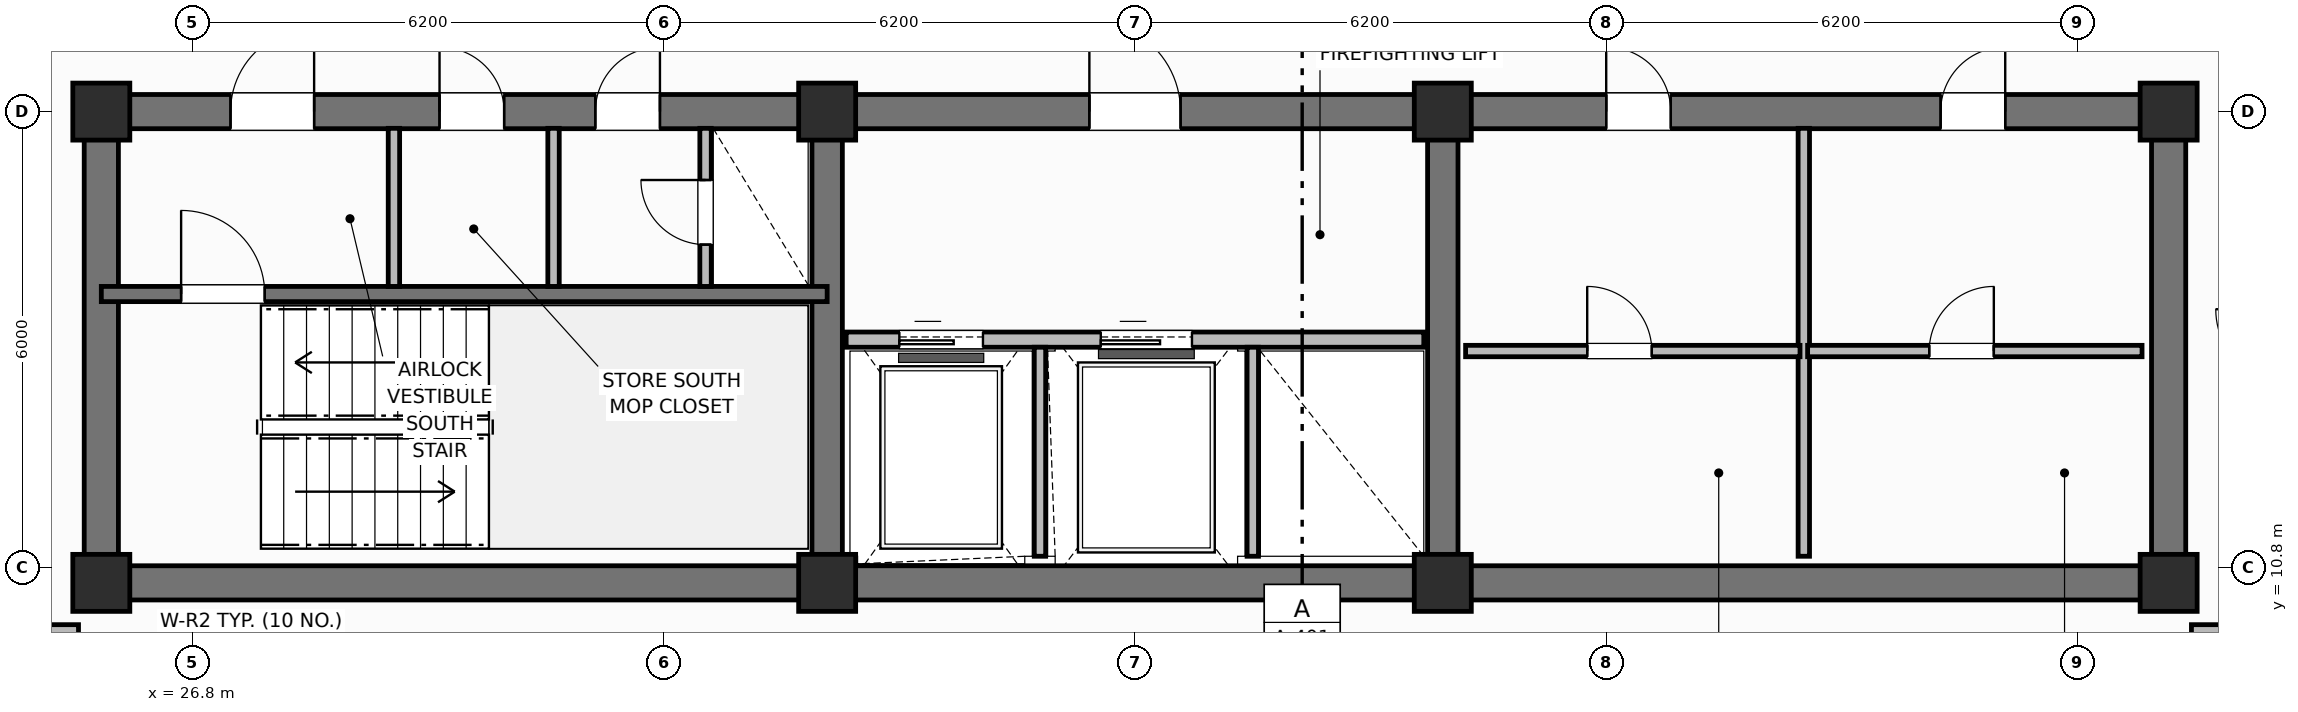
"""IFC4 building model, lengths in metres.
Left out: names, types, materials, properties, quantities, classifications, styles, units other than length and angle.
Written with IfcOpenShell. Run it as: python <this file> out.ifc"""

import sys

from ifc_helpers import new_model, si_unit, direction, frame, frame_2d, origin, origin_2d, place, context, subcontext, project, spatial, rectangle, extrude, element, fill, save


model = new_model("IFC4")
c1 = context("Model", 3, precision=1e-05, world=origin(), true_north=direction((0.0, 1.0)))
c2 = subcontext(c1, "Body", "Model", "MODEL_VIEW")
j1 = project(units=[si_unit("LENGTHUNIT", "METRE"), si_unit("PLANEANGLEUNIT", "RADIAN")], contexts=[c1])
p1 = place(None, origin())
s1 = spatial("IfcSite", under=j1, at=p1, CompositionType="ELEMENT")
p2 = place(p1, origin())
s2 = spatial("IfcBuilding", under=s1, at=p2, CompositionType="ELEMENT")
p3 = place(p2, frame((0.0, 0.0, 267.6)))
s3 = spatial("IfcBuildingStorey", under=s2, at=p3, CompositionType="ELEMENT", Elevation=267.6)
p4 = place(p3, frame((52.8, 10.6, 0.0), z_axis=(0.0, 0.0, 1.0), x_axis=(-1.0, 0.0, 0.0)))
e1 = element("IfcWall", 1, at=p4, inside=s3, PredefinedType="SHEAR", context=c2, shape_type="SweptSolid", body=[
    extrude(rectangle(XDim=27.2, YDim=0.45, at=frame_2d((13.6, 0.0))), origin(), (0.0, 0.0, 1.0), 3.7),
])
for number, where, z_axis, x_axis in (
    (2, (25.6, 10.825, 0.0), (0.0, 0.0, 1.0), (0.0, 1.0, 0.0)),
    (3, (52.8, 10.825, 0.0), (0.0, 0.0, 1.0), (0.0, 1.0, 0.0)),
):
    element("IfcWall", number, at=place(p3, frame(where, z_axis=z_axis, x_axis=x_axis)), inside=s3, PredefinedType="SHEAR", context=c2, shape_type="SweptSolid", body=[
        extrude(rectangle(XDim=5.75, YDim=0.45, at=frame_2d((2.875, 0.0))), origin(), (0.0, 0.0, 1.0), 3.7),
    ])
p5 = place(p3, frame((25.6, 16.8, 0.0), z_axis=(0.0, 0.0, 1.0), x_axis=(1.0, 0.0, 0.0)))
e4 = element("IfcWall", 4, at=p5, inside=s3, PredefinedType="SHEAR", context=c2, shape_type="SweptSolid", body=[
    extrude(rectangle(XDim=27.2, YDim=0.45, at=frame_2d((13.6, 0.0))), origin(), (0.0, 0.0, 1.0), 3.7),
])
p6 = place(p5, frame((1.7, 0.0, 0.0)))
e5 = element("IfcOpeningElement", 5, at=p6, cuts=e4, PredefinedType="OPENING", context=c2, shape_type="SweptSolid", body=[
    extrude(rectangle(XDim=1.1, YDim=2.15, at=frame_2d((0.55, 1.075))), frame((0.0, 0.235, 0.0), z_axis=(0.0, -1.0, 0.0), x_axis=(1.0, 0.0, 0.0)), (0.0, 0.0, 1.0), 0.47),
])
p7 = place(p5, frame((4.45, 0.0, 0.0)))
e6 = element("IfcOpeningElement", 6, at=p7, cuts=e4, PredefinedType="OPENING", context=c2, shape_type="SweptSolid", body=[
    extrude(rectangle(XDim=0.85, YDim=2.1, at=frame_2d((0.425, 1.05))), frame((0.0, 0.235, 0.0), z_axis=(0.0, -1.0, 0.0), x_axis=(1.0, 0.0, 0.0)), (0.0, 0.0, 1.0), 0.47),
])
p8 = place(p5, frame((6.5, 0.0, 0.0)))
e7 = element("IfcOpeningElement", 7, at=p8, cuts=e4, PredefinedType="OPENING", context=c2, shape_type="SweptSolid", body=[
    extrude(rectangle(XDim=0.85, YDim=2.1, at=frame_2d((0.425, 1.05))), frame((0.0, 0.235, 0.0), z_axis=(0.0, -1.0, 0.0), x_axis=(1.0, 0.0, 0.0)), (0.0, 0.0, 1.0), 0.47),
])
p9 = place(p5, frame((13.0, 0.0, 0.0)))
e8 = element("IfcOpeningElement", 8, at=p9, cuts=e4, PredefinedType="OPENING", context=c2, shape_type="SweptSolid", body=[
    extrude(rectangle(XDim=1.2, YDim=2.15, at=frame_2d((0.6, 1.075))), frame((0.0, 0.235, 0.0), z_axis=(0.0, -1.0, 0.0), x_axis=(1.0, 0.0, 0.0)), (0.0, 0.0, 1.0), 0.47),
])
p10 = place(p5, frame((19.8, 0.0, 0.0)))
e9 = element("IfcOpeningElement", 9, at=p10, cuts=e4, PredefinedType="OPENING", context=c2, shape_type="SweptSolid", body=[
    extrude(rectangle(XDim=0.85, YDim=2.1, at=frame_2d((0.425, 1.05))), frame((0.0, 0.235, 0.0), z_axis=(0.0, -1.0, 0.0), x_axis=(1.0, 0.0, 0.0)), (0.0, 0.0, 1.0), 0.47),
])
p11 = place(p5, frame((24.2, 0.0, 0.0)))
e10 = element("IfcOpeningElement", 10, at=p11, cuts=e4, PredefinedType="OPENING", context=c2, shape_type="SweptSolid", body=[
    extrude(rectangle(XDim=0.85, YDim=2.1, at=frame_2d((0.425, 1.05))), frame((0.0, 0.235, 0.0), z_axis=(0.0, -1.0, 0.0), x_axis=(1.0, 0.0, 0.0)), (0.0, 0.0, 1.0), 0.47),
])
for number, where, z_axis, x_axis in (
    (11, (35.15, 10.825, 0.0), (0.0, 0.0, 1.0), (0.0, 1.0, 0.0)),
    (12, (43.25, 10.825, 0.0), (0.0, 0.0, 1.0), (0.0, 1.0, 0.0)),
):
    element("IfcWall", number, at=place(p3, frame(where, z_axis=z_axis, x_axis=x_axis)), inside=s3, PredefinedType="SHEAR", context=c2, shape_type="SweptSolid", body=[
        extrude(rectangle(XDim=5.75, YDim=0.4, at=frame_2d((2.875, 0.0))), origin(), (0.0, 0.0, 1.0), 3.7),
    ])
for number, where, z_axis, x_axis in (
    (13, (25.6, 10.6, 0.0), (0.0, 0.0, 1.0), (1.0, 0.0, 0.0)),
    (14, (25.6, 16.8, 0.0), (0.0, 0.0, 1.0), (1.0, 0.0, 0.0)),
    (15, (35.15, 10.6, 0.0), (0.0, 0.0, 1.0), (1.0, 0.0, 0.0)),
    (16, (35.15, 16.8, 0.0), (0.0, 0.0, 1.0), (1.0, 0.0, 0.0)),
    (17, (43.25, 10.6, 0.0), (0.0, 0.0, 1.0), (1.0, 0.0, 0.0)),
    (18, (43.25, 16.8, 0.0), (0.0, 0.0, 1.0), (1.0, 0.0, 0.0)),
    (19, (52.8, 10.6, 0.0), (0.0, 0.0, 1.0), (1.0, 0.0, 0.0)),
    (20, (52.8, 16.8, 0.0), (0.0, 0.0, 1.0), (1.0, 0.0, 0.0)),
):
    element("IfcColumn", number, at=place(p3, frame(where, z_axis=z_axis, x_axis=x_axis)), inside=s3, PredefinedType="COLUMN", context=c2, shape_type="SweptSolid", body=[
        extrude(rectangle(XDim=0.75, YDim=0.75, at=origin_2d()), origin(), (0.0, 0.0, 1.0), 3.7),
    ])
p12 = place(p3, frame((25.6, 14.4, 0.0), z_axis=(0.0, 0.0, 1.0), x_axis=(1.0, 0.0, 0.0)))
e21 = element("IfcWall", 21, at=p12, inside=s3, PredefinedType="SHEAR", context=c2, shape_type="SweptSolid", body=[
    extrude(rectangle(XDim=9.55, YDim=0.2, at=frame_2d((4.775, 0.0))), origin(), (0.0, 0.0, 1.0), 3.7),
])
p13 = place(p12, frame((1.05, 0.0, 0.0)))
e22 = element("IfcOpeningElement", 22, at=p13, cuts=e21, PredefinedType="OPENING", context=c2, shape_type="SweptSolid", body=[
    extrude(rectangle(XDim=1.1, YDim=2.15, at=frame_2d((0.55, 1.075))), frame((0.0, 0.11, 0.0), z_axis=(0.0, -1.0, 0.0), x_axis=(1.0, 0.0, 0.0)), (0.0, 0.0, 1.0), 0.22),
])
for number, where, z_axis, x_axis in (
    (23, (29.45, 14.5, 0.0), (0.0, 0.0, 1.0), (0.0, 1.0, 0.0)),
    (24, (31.55, 14.5, 0.0), (0.0, 0.0, 1.0), (0.0, 1.0, 0.0)),
):
    element("IfcWall", number, at=place(p3, frame(where, z_axis=z_axis, x_axis=x_axis)), inside=s3, PredefinedType="PARTITIONING", context=c2, shape_type="SweptSolid", body=[
        extrude(rectangle(XDim=2.08, YDim=0.15, at=frame_2d((1.04, 0.0))), origin(), (0.0, 0.0, 1.0), 2.56),
    ])
p14 = place(p3, frame((33.55, 14.5, 0.0), z_axis=(0.0, 0.0, 1.0), x_axis=(0.0, 1.0, 0.0)))
e25 = element("IfcWall", 25, at=p14, inside=s3, PredefinedType="PARTITIONING", context=c2, shape_type="SweptSolid", body=[
    extrude(rectangle(XDim=2.08, YDim=0.15, at=frame_2d((1.04, 0.0))), origin(), (0.0, 0.0, 1.0), 2.56),
])
p15 = place(p14, frame((0.55, 0.0, 0.0)))
e26 = element("IfcOpeningElement", 26, at=p15, cuts=e25, PredefinedType="OPENING", context=c2, shape_type="SweptSolid", body=[
    extrude(rectangle(XDim=0.85, YDim=2.05, at=frame_2d((0.425, 1.025))), frame((0.0, 0.085, 0.0), z_axis=(0.0, -1.0, 0.0), x_axis=(1.0, 0.0, 0.0)), (0.0, 0.0, 1.0), 0.17),
])
p16 = place(p3, frame((35.4, 13.8, 0.0), z_axis=(0.0, 0.0, 1.0), x_axis=(1.0, 0.0, 0.0)))
e27 = element("IfcWall", 27, at=p16, inside=s3, PredefinedType="PARTITIONING", context=c2, shape_type="SweptSolid", body=[
    extrude(rectangle(XDim=7.6, YDim=0.2, at=frame_2d((3.8, 0.0))), origin(), (0.0, 0.0, 1.0), 2.33),
])
p17 = place(p16, frame((0.7, 0.0, 0.0)))
e28 = element("IfcOpeningElement", 28, at=p17, cuts=e27, PredefinedType="OPENING", context=c2, shape_type="SweptSolid", body=[
    extrude(rectangle(XDim=1.1, YDim=2.15, at=frame_2d((0.55, 1.075))), frame((0.0, 0.11, 0.0), z_axis=(0.0, -1.0, 0.0), x_axis=(1.0, 0.0, 0.0)), (0.0, 0.0, 1.0), 0.22),
])
p18 = place(p16, frame((3.35, 0.0, 0.0)))
e29 = element("IfcOpeningElement", 29, at=p18, cuts=e27, PredefinedType="OPENING", context=c2, shape_type="SweptSolid", body=[
    extrude(rectangle(XDim=1.2, YDim=2.15, at=frame_2d((0.6, 1.075))), frame((0.0, 0.11, 0.0), z_axis=(0.0, -1.0, 0.0), x_axis=(1.0, 0.0, 0.0)), (0.0, 0.0, 1.0), 0.22),
])
for number, where, z_axis, x_axis in (
    (30, (37.95, 10.95, 0.0), (0.0, 0.0, 1.0), (0.0, 1.0, 0.0)),
    (31, (40.75, 10.95, 0.0), (0.0, 0.0, 1.0), (0.0, 1.0, 0.0)),
):
    element("IfcWall", number, at=place(p3, frame(where, z_axis=z_axis, x_axis=x_axis)), inside=s3, PredefinedType="PARTITIONING", context=c2, shape_type="SweptSolid", body=[
        extrude(rectangle(XDim=2.75, YDim=0.15, at=frame_2d((1.375, 0.0))), origin(), (0.0, 0.0, 1.0), 2.56),
    ])
p19 = place(p3, frame((48.0, 10.95, 0.0), z_axis=(0.0, 0.0, 1.0), x_axis=(0.0, 1.0, 0.0)))
e32 = element("IfcWall", 32, at=p19, inside=s3, PredefinedType="PARTITIONING", context=c2, shape_type="SweptSolid", body=[
    extrude(rectangle(XDim=5.63, YDim=0.15, at=frame_2d((2.815, 0.0))), origin(), (0.0, 0.0, 1.0), 2.56),
])
p20 = place(p3, frame((43.55, 13.65, 0.0), z_axis=(0.0, 0.0, 1.0), x_axis=(1.0, 0.0, 0.0)))
e33 = element("IfcWall", 33, at=p20, inside=s3, PredefinedType="PARTITIONING", context=c2, shape_type="SweptSolid", body=[
    extrude(rectangle(XDim=4.4, YDim=0.15, at=frame_2d((2.2, 0.0))), origin(), (0.0, 0.0, 1.0), 2.56),
])
p21 = place(p20, frame((1.6, 0.0, 0.0)))
e34 = element("IfcOpeningElement", 34, at=p21, cuts=e33, PredefinedType="OPENING", context=c2, shape_type="SweptSolid", body=[
    extrude(rectangle(XDim=0.85, YDim=2.1, at=frame_2d((0.425, 1.05))), frame((0.0, 0.085, 0.0), z_axis=(0.0, -1.0, 0.0), x_axis=(1.0, 0.0, 0.0)), (0.0, 0.0, 1.0), 0.17),
])
p22 = place(p3, frame((48.05, 13.65, 0.0), z_axis=(0.0, 0.0, 1.0), x_axis=(1.0, 0.0, 0.0)))
e35 = element("IfcWall", 35, at=p22, inside=s3, PredefinedType="PARTITIONING", context=c2, shape_type="SweptSolid", body=[
    extrude(rectangle(XDim=4.4, YDim=0.15, at=frame_2d((2.2, 0.0))), origin(), (0.0, 0.0, 1.0), 2.56),
])
p23 = place(p22, frame((1.6, 0.0, 0.0)))
e36 = element("IfcOpeningElement", 36, at=p23, cuts=e35, PredefinedType="OPENING", context=c2, shape_type="SweptSolid", body=[
    extrude(rectangle(XDim=0.85, YDim=2.1, at=frame_2d((0.425, 1.05))), frame((0.0, 0.085, 0.0), z_axis=(0.0, -1.0, 0.0), x_axis=(1.0, 0.0, 0.0)), (0.0, 0.0, 1.0), 0.17),
])
p24 = place(p3, frame((21.546, 9.95, 0.0), z_axis=(0.0, 0.0, 1.0), x_axis=(1.0, 0.0, 0.0)))
e37 = element("IfcWall", 37, at=p24, inside=s3, PredefinedType="PARTITIONING", context=c2, shape_type="SweptSolid", body=[
    extrude(rectangle(XDim=3.754, YDim=0.2, at=frame_2d((1.877, 0.0))), origin(), (0.0, 0.0, 1.0), 2.56),
])
p25 = place(p3, frame((53.1, 9.95, 0.0), z_axis=(0.0, 0.0, 1.0), x_axis=(1.0, 0.0, 0.0)))
e38 = element("IfcWall", 38, at=p25, inside=s3, PredefinedType="PARTITIONING", context=c2, shape_type="SweptSolid", body=[
    extrude(rectangle(XDim=3.754, YDim=0.2, at=frame_2d((1.877, 0.0))), origin(), (0.0, 0.0, 1.0), 2.56),
])
p26 = place(p13, origin())
e39 = element("IfcDoor", 39, at=p26, inside=s3, OperationType="SINGLE_SWING_LEFT", PredefinedType="DOOR", context=c2, shape_type="SweptSolid", body=[
    extrude(rectangle(XDim=1.1, YDim=2.15, at=frame_2d((0.55, 1.075))), frame((0.0, 0.025, 0.0), z_axis=(0.0, -1.0, 0.0), x_axis=(1.0, 0.0, 0.0)), (0.0, 0.0, 1.0), 0.05),
])
fill(e22, e39)
p27 = place(p15, origin())
e40 = element("IfcDoor", 40, at=p27, inside=s3, OperationType="SINGLE_SWING_RIGHT", PredefinedType="TRAPDOOR", context=c2, shape_type="SweptSolid", body=[
    extrude(rectangle(XDim=0.85, YDim=2.05, at=frame_2d((0.425, 1.025))), frame((0.0, 0.025, 0.0), z_axis=(0.0, -1.0, 0.0), x_axis=(1.0, 0.0, 0.0)), (0.0, 0.0, 1.0), 0.05),
])
fill(e26, e40)
p28 = place(p17, origin())
e41 = element("IfcDoor", 41, at=p28, inside=s3, OperationType="SLIDING_TO_LEFT", PredefinedType="DOOR", context=c2, shape_type="SweptSolid", body=[
    extrude(rectangle(XDim=1.1, YDim=2.15, at=frame_2d((0.55, 1.075))), frame((0.0, 0.025, 0.0), z_axis=(0.0, -1.0, 0.0), x_axis=(1.0, 0.0, 0.0)), (0.0, 0.0, 1.0), 0.05),
])
fill(e28, e41)
p29 = place(p18, origin())
e42 = element("IfcDoor", 42, at=p29, inside=s3, OperationType="SLIDING_TO_LEFT", PredefinedType="DOOR", context=c2, shape_type="SweptSolid", body=[
    extrude(rectangle(XDim=1.2, YDim=2.15, at=frame_2d((0.6, 1.075))), frame((0.0, 0.025, 0.0), z_axis=(0.0, -1.0, 0.0), x_axis=(1.0, 0.0, 0.0)), (0.0, 0.0, 1.0), 0.05),
])
fill(e29, e42)
p30 = place(p21, origin())
e43 = element("IfcDoor", 43, at=p30, inside=s3, OperationType="SINGLE_SWING_LEFT", PredefinedType="DOOR", context=c2, shape_type="SweptSolid", body=[
    extrude(rectangle(XDim=0.85, YDim=2.1, at=frame_2d((0.425, 1.05))), frame((0.0, 0.025, 0.0), z_axis=(0.0, -1.0, 0.0), x_axis=(1.0, 0.0, 0.0)), (0.0, 0.0, 1.0), 0.05),
])
fill(e34, e43)
p31 = place(p23, origin())
e44 = element("IfcDoor", 44, at=p31, inside=s3, OperationType="SINGLE_SWING_RIGHT", PredefinedType="DOOR", context=c2, shape_type="SweptSolid", body=[
    extrude(rectangle(XDim=0.85, YDim=2.1, at=frame_2d((0.425, 1.05))), frame((0.0, 0.025, 0.0), z_axis=(0.0, -1.0, 0.0), x_axis=(1.0, 0.0, 0.0)), (0.0, 0.0, 1.0), 0.05),
])
fill(e36, e44)
p32 = place(p6, origin())
e45 = element("IfcDoor", 45, at=p32, inside=s3, OperationType="SINGLE_SWING_RIGHT", PredefinedType="DOOR", context=c2, shape_type="SweptSolid", body=[
    extrude(rectangle(XDim=1.1, YDim=2.15, at=frame_2d((0.55, 1.075))), frame((0.0, 0.025, 0.0), z_axis=(0.0, -1.0, 0.0), x_axis=(1.0, 0.0, 0.0)), (0.0, 0.0, 1.0), 0.05),
])
fill(e5, e45)
p33 = place(p7, origin())
e46 = element("IfcDoor", 46, at=p33, inside=s3, OperationType="SINGLE_SWING_LEFT", PredefinedType="DOOR", context=c2, shape_type="SweptSolid", body=[
    extrude(rectangle(XDim=0.85, YDim=2.1, at=frame_2d((0.425, 1.05))), frame((0.0, 0.025, 0.0), z_axis=(0.0, -1.0, 0.0), x_axis=(1.0, 0.0, 0.0)), (0.0, 0.0, 1.0), 0.05),
])
fill(e6, e46)
p34 = place(p8, origin())
e47 = element("IfcDoor", 47, at=p34, inside=s3, OperationType="SINGLE_SWING_RIGHT", PredefinedType="DOOR", context=c2, shape_type="SweptSolid", body=[
    extrude(rectangle(XDim=0.85, YDim=2.1, at=frame_2d((0.425, 1.05))), frame((0.0, 0.025, 0.0), z_axis=(0.0, -1.0, 0.0), x_axis=(1.0, 0.0, 0.0)), (0.0, 0.0, 1.0), 0.05),
])
fill(e7, e47)
p35 = place(p9, origin())
e48 = element("IfcDoor", 48, at=p35, inside=s3, OperationType="SINGLE_SWING_LEFT", PredefinedType="DOOR", context=c2, shape_type="SweptSolid", body=[
    extrude(rectangle(XDim=1.2, YDim=2.15, at=frame_2d((0.6, 1.075))), frame((0.0, 0.025, 0.0), z_axis=(0.0, -1.0, 0.0), x_axis=(1.0, 0.0, 0.0)), (0.0, 0.0, 1.0), 0.05),
])
fill(e8, e48)
p36 = place(p10, origin())
e49 = element("IfcDoor", 49, at=p36, inside=s3, OperationType="SINGLE_SWING_LEFT", PredefinedType="DOOR", context=c2, shape_type="SweptSolid", body=[
    extrude(rectangle(XDim=0.85, YDim=2.1, at=frame_2d((0.425, 1.05))), frame((0.0, 0.025, 0.0), z_axis=(0.0, -1.0, 0.0), x_axis=(1.0, 0.0, 0.0)), (0.0, 0.0, 1.0), 0.05),
])
fill(e9, e49)
p37 = place(p11, origin())
e50 = element("IfcDoor", 50, at=p37, inside=s3, OperationType="SINGLE_SWING_RIGHT", PredefinedType="DOOR", context=c2, shape_type="SweptSolid", body=[
    extrude(rectangle(XDim=0.85, YDim=2.1, at=frame_2d((0.425, 1.05))), frame((0.0, 0.025, 0.0), z_axis=(0.0, -1.0, 0.0), x_axis=(1.0, 0.0, 0.0)), (0.0, 0.0, 1.0), 0.05),
])
fill(e10, e50)
save(model, sys.argv[1])
